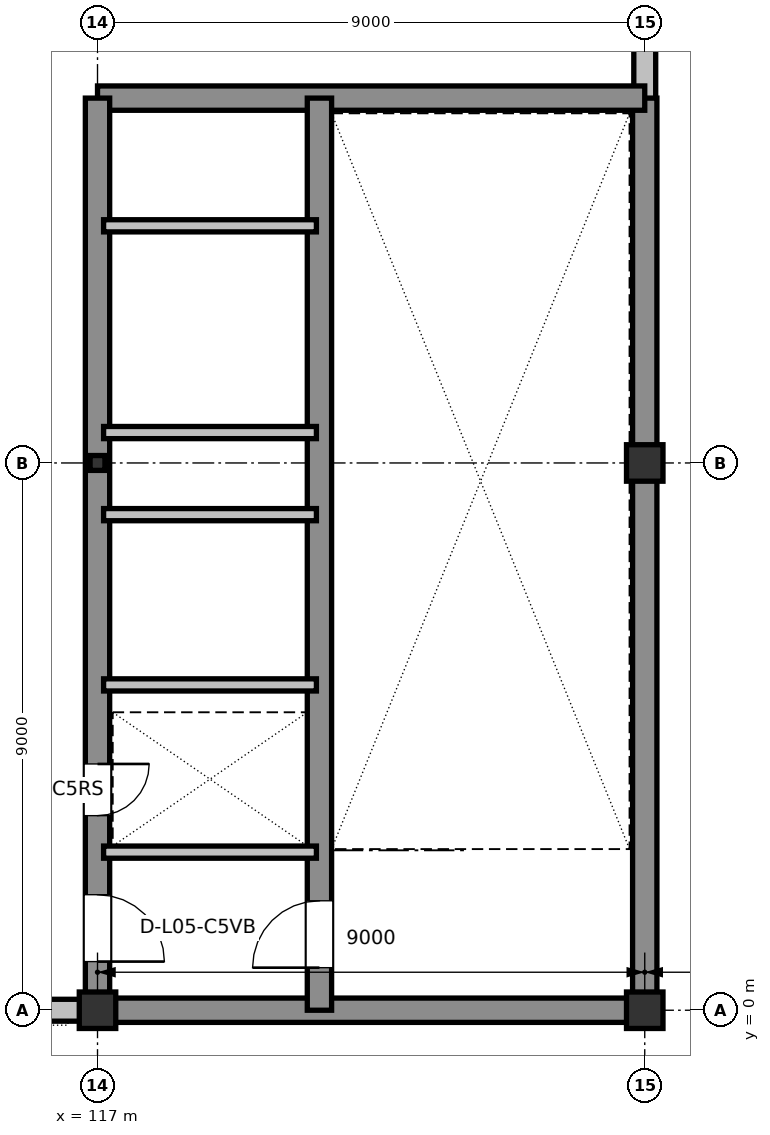
"""IFC4 building model, lengths in metres.
Left out: names, types, materials, properties, quantities, classifications, styles, units other than length and angle.
Written with IfcOpenShell. Run it as: python <this file> out.ifc"""

import sys

from ifc_helpers import new_model, si_unit, direction, frame, frame_2d, origin, origin_2d, place, context, subcontext, project, spatial, rectangle, hollow_circle, extrude, element, fill, save


model = new_model("IFC4")
c1 = context("Model", 3, precision=1e-05, world=origin(), true_north=direction((0.0, 1.0)))
c2 = subcontext(c1, "Body", "Model", "MODEL_VIEW")
j1 = project(units=[si_unit("LENGTHUNIT", "METRE"), si_unit("PLANEANGLEUNIT", "RADIAN")], contexts=[c1])
p1 = place(None, origin())
s1 = spatial("IfcSite", under=j1, at=p1, CompositionType="ELEMENT")
p2 = place(p1, origin())
s2 = spatial("IfcBuilding", under=s1, at=p2, CompositionType="ELEMENT")
p3 = place(p2, frame((0.0, 0.0, 23.4)))
s3 = spatial("IfcBuildingStorey", under=s2, at=p3, CompositionType="ELEMENT", Elevation=23.4)
p4 = place(p3, frame((117.0, 0.0, 0.0), z_axis=(0.0, 0.0, 1.0), x_axis=(1.0, 0.0, 0.0)))
e1 = element("IfcColumn", 1, at=p4, inside=s3, PredefinedType="COLUMN", context=c2, shape_type="SweptSolid", body=[
    extrude(rectangle(XDim=0.6, YDim=0.6, at=origin_2d()), origin(), (0.0, 0.0, 1.0), 4.2),
])
p5 = place(p3, frame((117.0, 9.0, 0.0), z_axis=(0.0, 0.0, 1.0), x_axis=(1.0, 0.0, 0.0)))
e2 = element("IfcColumn", 2, at=p5, inside=s3, PredefinedType="COLUMN", context=c2, shape_type="SweptSolid", body=[
    extrude(hollow_circle(Radius=0.122, WallThickness=0.012, at=origin_2d()), origin(), (0.0, 0.0, 1.0), 4.2),
])
for number, where, z_axis, x_axis in (
    (3, (126.0, 0.0, 0.0), (0.0, 0.0, 1.0), (1.0, 0.0, 0.0)),
    (4, (126.0, 9.0, 0.0), (0.0, 0.0, 1.0), (1.0, 0.0, 0.0)),
):
    element("IfcColumn", number, at=place(p3, frame(where, z_axis=z_axis, x_axis=x_axis)), inside=s3, PredefinedType="COLUMN", context=c2, shape_type="SweptSolid", body=[
        extrude(rectangle(XDim=0.6, YDim=0.6, at=origin_2d()), origin(), (0.0, 0.0, 1.0), 4.2),
    ])
p6 = place(p3, frame((108.285, 0.0, 0.0), z_axis=(0.0, 0.0, 1.0), x_axis=(1.0, 0.0, 0.0)))
e5 = element("IfcWall", 5, at=p6, inside=s3, PredefinedType="STANDARD", context=c2, shape_type="SweptSolid", body=[
    extrude(rectangle(XDim=8.43, YDim=0.36, at=frame_2d((4.215, 0.0))), origin(), (0.0, 0.0, 1.0), 3.735),
])
p7 = place(p6, frame((3.715, 0.0, 0.9)))
e6 = element("IfcOpeningElement", 6, at=p7, cuts=e5, PredefinedType="OPENING", context=c2, shape_type="SweptSolid", body=[
    extrude(rectangle(XDim=1.0, YDim=1.35, at=frame_2d((0.5, 0.675))), frame((0.0, 0.19, 0.0), z_axis=(0.0, -1.0, 0.0), x_axis=(1.0, 0.0, 0.0)), (0.0, 0.0, 1.0), 0.38),
])
p8 = place(p3, frame((126.0, 14.925, 0.0), z_axis=(0.0, 0.0, 1.0), x_axis=(0.0, 1.0, 0.0)))
e7 = element("IfcWall", 7, at=p8, inside=s3, PredefinedType="STANDARD", context=c2, shape_type="SweptSolid", body=[
    extrude(rectangle(XDim=2.79, YDim=0.36, at=frame_2d((1.395, 0.0))), origin(), (0.0, 0.0, 1.0), 3.695),
])
p9 = place(p3, frame((117.0, 0.0, 0.0), z_axis=(0.0, 0.0, 1.0), x_axis=(1.0, 0.0, 0.0)))
e8 = element("IfcWall", 8, at=p9, inside=s3, PredefinedType="SHEAR", context=c2, shape_type="SweptSolid", body=[
    extrude(rectangle(XDim=9.0, YDim=0.4, at=frame_2d((4.5, 0.0))), origin(), (0.0, 0.0, 1.0), 3.96),
])
p10 = place(p3, frame((126.0, 0.0, 0.0), z_axis=(0.0, 0.0, 1.0), x_axis=(0.0, 1.0, 0.0)))
e9 = element("IfcWall", 9, at=p10, inside=s3, PredefinedType="SHEAR", context=c2, shape_type="SweptSolid", body=[
    extrude(rectangle(XDim=15.0, YDim=0.4, at=frame_2d((7.5, 0.0))), origin(), (0.0, 0.0, 1.0), 3.96),
])
p11 = place(p3, frame((126.0, 15.0, 0.0), z_axis=(0.0, 0.0, 1.0), x_axis=(-1.0, 0.0, 0.0)))
e10 = element("IfcWall", 10, at=p11, inside=s3, PredefinedType="SHEAR", context=c2, shape_type="SweptSolid", body=[
    extrude(rectangle(XDim=9.0, YDim=0.4, at=frame_2d((4.5, 0.0))), origin(), (0.0, 0.0, 1.0), 3.96),
])
p12 = place(p3, frame((117.0, 15.0, 0.0), z_axis=(0.0, 0.0, 1.0), x_axis=(0.0, -1.0, 0.0)))
e11 = element("IfcWall", 11, at=p12, inside=s3, PredefinedType="SHEAR", context=c2, shape_type="SweptSolid", body=[
    extrude(rectangle(XDim=15.0, YDim=0.4, at=frame_2d((7.5, 0.0))), origin(), (0.0, 0.0, 1.0), 3.96),
])
p13 = place(p12, frame((13.1, 0.0, 0.0)))
e12 = element("IfcOpeningElement", 12, at=p13, cuts=e11, PredefinedType="OPENING", context=c2, shape_type="SweptSolid", body=[
    extrude(rectangle(XDim=1.1, YDim=2.16, at=frame_2d((0.55, 1.08))), frame((0.0, 0.21, 0.0), z_axis=(0.0, -1.0, 0.0), x_axis=(1.0, 0.0, 0.0)), (0.0, 0.0, 1.0), 0.42),
])
p14 = place(p12, frame((10.95, 0.0, 0.0)))
e13 = element("IfcOpeningElement", 13, at=p14, cuts=e11, PredefinedType="OPENING", context=c2, shape_type="SweptSolid", body=[
    extrude(rectangle(XDim=0.85, YDim=2.1, at=frame_2d((0.425, 1.05))), frame((0.0, 0.21, 0.0), z_axis=(0.0, -1.0, 0.0), x_axis=(1.0, 0.0, 0.0)), (0.0, 0.0, 1.0), 0.42),
])
p15 = place(p3, frame((120.65, 0.0, 0.0), z_axis=(0.0, 0.0, 1.0), x_axis=(0.0, 1.0, 0.0)))
e14 = element("IfcWall", 14, at=p15, inside=s3, PredefinedType="SHEAR", context=c2, shape_type="SweptSolid", body=[
    extrude(rectangle(XDim=15.0, YDim=0.4, at=frame_2d((7.5, 0.0))), origin(), (0.0, 0.0, 1.0), 3.96),
])
p16 = place(p15, frame((0.7, 0.0, 0.0)))
e15 = element("IfcOpeningElement", 15, at=p16, cuts=e14, PredefinedType="OPENING", context=c2, shape_type="SweptSolid", body=[
    extrude(rectangle(XDim=1.1, YDim=2.16, at=frame_2d((0.55, 1.08))), frame((0.0, 0.21, 0.0), z_axis=(0.0, -1.0, 0.0), x_axis=(1.0, 0.0, 0.0)), (0.0, 0.0, 1.0), 0.42),
])
for number, where, z_axis, x_axis in (
    (16, (117.1, 2.6, 0.0), (0.0, 0.0, 1.0), (1.0, 0.0, 0.0)),
    (17, (117.1, 5.35, 0.0), (0.0, 0.0, 1.0), (1.0, 0.0, 0.0)),
    (18, (117.1, 8.15, 0.0), (0.0, 0.0, 1.0), (1.0, 0.0, 0.0)),
    (19, (117.1, 9.5, 0.0), (0.0, 0.0, 1.0), (1.0, 0.0, 0.0)),
    (20, (117.1, 12.9, 0.0), (0.0, 0.0, 1.0), (1.0, 0.0, 0.0)),
):
    element("IfcWall", number, at=place(p3, frame(where, z_axis=z_axis, x_axis=x_axis)), inside=s3, PredefinedType="PARTITIONING", context=c2, shape_type="SweptSolid", body=[
        extrude(rectangle(XDim=3.5, YDim=0.2, at=frame_2d((1.75, 0.0))), origin(), (0.0, 0.0, 1.0), 3.96),
    ])
p17 = place(p16, origin())
e21 = element("IfcDoor", 21, at=p17, inside=s3, OperationType="SINGLE_SWING_LEFT", PredefinedType="DOOR", context=c2, shape_type="SweptSolid", body=[
    extrude(rectangle(XDim=1.1, YDim=2.16, at=frame_2d((0.55, 1.08))), frame((0.0, 0.025, 0.0), z_axis=(0.0, -1.0, 0.0), x_axis=(1.0, 0.0, 0.0)), (0.0, 0.0, 1.0), 0.05),
])
fill(e15, e21)
p18 = place(p13, origin())
e22 = element("IfcDoor", 22, at=p18, inside=s3, OperationType="SINGLE_SWING_RIGHT", PredefinedType="DOOR", context=c2, shape_type="SweptSolid", body=[
    extrude(rectangle(XDim=1.1, YDim=2.16, at=frame_2d((0.55, 1.08))), frame((0.0, 0.025, 0.0), z_axis=(0.0, -1.0, 0.0), x_axis=(1.0, 0.0, 0.0)), (0.0, 0.0, 1.0), 0.05),
])
fill(e12, e22)
p19 = place(p14, origin())
e23 = element("IfcDoor", 23, at=p19, inside=s3, OperationType="SINGLE_SWING_LEFT", PredefinedType="DOOR", context=c2, shape_type="SweptSolid", body=[
    extrude(rectangle(XDim=0.85, YDim=2.1, at=frame_2d((0.425, 1.05))), frame((0.0, 0.025, 0.0), z_axis=(0.0, -1.0, 0.0), x_axis=(1.0, 0.0, 0.0)), (0.0, 0.0, 1.0), 0.05),
])
fill(e13, e23)
save(model, sys.argv[1])
